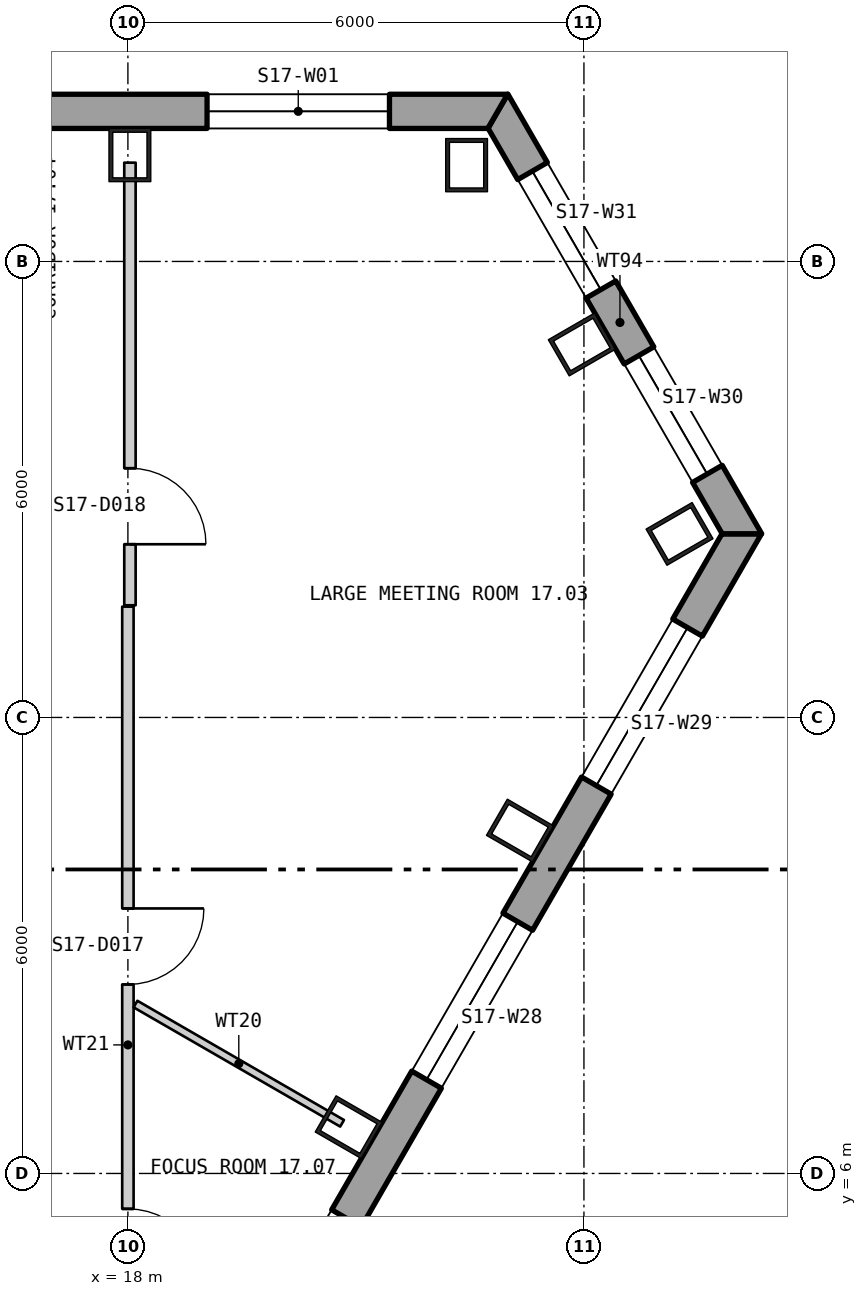
"""IFC4 building model, lengths in metres.
Left out: names, types, materials, properties, quantities, classifications, styles, units other than length and angle.
Written with IfcOpenShell. Run it as: python <this file> out.ifc"""

import sys

from ifc_helpers import new_model, si_unit, direction, frame, frame_2d, origin, origin_2d, place, context, subcontext, project, spatial, polyline, rectangle, hollow_rectangle, outline, extrude, element, fill, save


model = new_model("IFC4")
c1 = context("Model", 3, precision=1e-05, world=origin(), true_north=direction((0.0, 1.0)))
c2 = subcontext(c1, "Body", "Model", "MODEL_VIEW")
j1 = project(units=[si_unit("LENGTHUNIT", "METRE"), si_unit("PLANEANGLEUNIT", "RADIAN")], contexts=[c1])
p1 = place(None, origin())
s1 = spatial("IfcSite", under=j1, at=p1, CompositionType="ELEMENT")
p2 = place(p1, origin())
s2 = spatial("IfcBuilding", under=s1, at=p2, CompositionType="ELEMENT")
p3 = place(p2, frame((0.0, 0.0, 227.7)))
s3 = spatial("IfcBuildingStorey", under=s2, at=p3, CompositionType="ELEMENT", Elevation=227.7)
for number, where, z_axis, x_axis in (
    (1, (22.456, 19.267, 0.0), (0.0, 0.0, 1.0), (-1.0, 0.0, 0.0)),
    (2, (18.026, 19.4, 0.0), (0.0, 0.0, 1.0), (-1.0, 0.0, 0.0)),
    (3, (20.905, 6.609, 0.0), (0.0, 0.0, 1.0), (0.5, 0.866, 0.0)),
    (4, (23.158, 10.512, 0.0), (0.0, 0.0, 1.0), (0.5, 0.866, 0.0)),
    (5, (25.258, 14.415, 0.0), (0.0, 0.0, 1.0), (-0.5, 0.866, 0.0)),
    (6, (23.972, 16.907, 0.0), (0.0, 0.0, 1.0), (-0.5, 0.866, 0.0)),
):
    element("IfcColumn", number, at=place(p3, frame(where, z_axis=z_axis, x_axis=x_axis)), inside=s3, PredefinedType="COLUMN", context=c2, shape_type="SweptSolid", body=[
        extrude(hollow_rectangle(XDim=0.55, YDim=0.7, WallThickness=0.05, at=origin_2d()), origin(), (0.0, 0.0, 1.0), 3.9),
    ])
p4 = place(p3, frame((22.865, 19.975, -0.4), z_axis=(0.0, 0.0, 1.0), x_axis=(-1.0, 0.0, 0.0)))
e7 = element("IfcWall", 7, at=p4, inside=s3, PredefinedType="SOLIDWALL", context=c2, shape_type="SweptSolid", body=[
    extrude(outline(polyline([(-0.13, -0.225), (45.86, -0.225), (45.6, 0.225), (0.13, 0.225), (-0.13, -0.225)])), origin(), (0.0, 0.0, 1.0), 3.9),
])
p5 = place(p4, frame((1.424, 0.0, 1.3)))
e8 = element("IfcOpeningElement", 8, at=p5, cuts=e7, PredefinedType="OPENING", context=c2, shape_type="SweptSolid", body=[
    extrude(rectangle(XDim=2.4, YDim=2.0, at=frame_2d((1.2, 1.0))), frame((0.0, 0.235, 0.0), z_axis=(0.0, -1.0, 0.0), x_axis=(1.0, 0.0, 0.0)), (0.0, 0.0, 1.0), 0.47),
])
p6 = place(p4, frame((10.399, 0.0, 1.3)))
e9 = element("IfcOpeningElement", 9, at=p6, cuts=e7, PredefinedType="OPENING", context=c2, shape_type="SweptSolid", body=[
    extrude(rectangle(XDim=2.4, YDim=2.0, at=frame_2d((1.2, 1.0))), frame((0.0, 0.235, 0.0), z_axis=(0.0, -1.0, 0.0), x_axis=(1.0, 0.0, 0.0)), (0.0, 0.0, 1.0), 0.47),
])
p7 = place(p4, frame((14.905, 0.0, 1.3)))
e10 = element("IfcOpeningElement", 10, at=p7, cuts=e7, PredefinedType="OPENING", context=c2, shape_type="SweptSolid", body=[
    extrude(rectangle(XDim=2.4, YDim=2.0, at=frame_2d((1.2, 1.0))), frame((0.0, 0.235, 0.0), z_axis=(0.0, -1.0, 0.0), x_axis=(1.0, 0.0, 0.0)), (0.0, 0.0, 1.0), 0.47),
])
p8 = place(p4, frame((19.412, 0.0, 1.3)))
e11 = element("IfcOpeningElement", 11, at=p8, cuts=e7, PredefinedType="OPENING", context=c2, shape_type="SweptSolid", body=[
    extrude(rectangle(XDim=2.4, YDim=2.0, at=frame_2d((1.2, 1.0))), frame((0.0, 0.235, 0.0), z_axis=(0.0, -1.0, 0.0), x_axis=(1.0, 0.0, 0.0)), (0.0, 0.0, 1.0), 0.47),
])
p9 = place(p4, frame((23.918, 0.0, 1.3)))
e12 = element("IfcOpeningElement", 12, at=p9, cuts=e7, PredefinedType="OPENING", context=c2, shape_type="SweptSolid", body=[
    extrude(rectangle(XDim=2.4, YDim=2.0, at=frame_2d((1.2, 1.0))), frame((0.0, 0.235, 0.0), z_axis=(0.0, -1.0, 0.0), x_axis=(1.0, 0.0, 0.0)), (0.0, 0.0, 1.0), 0.47),
])
p10 = place(p4, frame((28.425, 0.0, 1.3)))
e13 = element("IfcOpeningElement", 13, at=p10, cuts=e7, PredefinedType="OPENING", context=c2, shape_type="SweptSolid", body=[
    extrude(rectangle(XDim=2.4, YDim=2.0, at=frame_2d((1.2, 1.0))), frame((0.0, 0.235, 0.0), z_axis=(0.0, -1.0, 0.0), x_axis=(1.0, 0.0, 0.0)), (0.0, 0.0, 1.0), 0.47),
])
p11 = place(p4, frame((32.932, 0.0, 1.3)))
e14 = element("IfcOpeningElement", 14, at=p11, cuts=e7, PredefinedType="OPENING", context=c2, shape_type="SweptSolid", body=[
    extrude(rectangle(XDim=2.4, YDim=2.0, at=frame_2d((1.2, 1.0))), frame((0.0, 0.235, 0.0), z_axis=(0.0, -1.0, 0.0), x_axis=(1.0, 0.0, 0.0)), (0.0, 0.0, 1.0), 0.47),
])
p12 = place(p4, frame((41.907, 0.0, 1.3)))
e15 = element("IfcOpeningElement", 15, at=p12, cuts=e7, PredefinedType="OPENING", context=c2, shape_type="SweptSolid", body=[
    extrude(rectangle(XDim=2.4, YDim=2.0, at=frame_2d((1.2, 1.0))), frame((0.0, 0.235, 0.0), z_axis=(0.0, -1.0, 0.0), x_axis=(1.0, 0.0, 0.0)), (0.0, 0.0, 1.0), 0.47),
])
p13 = place(p3, frame((3.21, -25.189, -0.18), z_axis=(0.0, 0.0, 1.0), x_axis=(0.499999194392, 0.866025868902, 0.0)))
e16 = element("IfcWall", 16, at=p13, inside=s3, PredefinedType="SOLIDWALL", context=c2, shape_type="SweptSolid", body=[
    extrude(outline(polyline([(-0.13, -0.225), (45.86, -0.225), (45.6, 0.225), (0.13, 0.225), (-0.13, -0.225)])), origin(), (0.0, 0.0, 1.0), 3.68),
])
p14 = place(p13, frame((1.424, 0.0, 1.08)))
e17 = element("IfcOpeningElement", 17, at=p14, cuts=e16, PredefinedType="OPENING", context=c2, shape_type="SweptSolid", body=[
    extrude(rectangle(XDim=2.4, YDim=2.0, at=frame_2d((1.2, 1.0))), frame((0.0, 0.235, 0.0), z_axis=(0.0, -1.0, 0.0), x_axis=(1.0, 0.0, 0.0)), (0.0, 0.0, 1.0), 0.47),
])
p15 = place(p13, frame((5.892, 0.0, 1.08)))
e18 = element("IfcOpeningElement", 18, at=p15, cuts=e16, PredefinedType="OPENING", context=c2, shape_type="SweptSolid", body=[
    extrude(rectangle(XDim=2.4, YDim=2.0, at=frame_2d((1.2, 1.0))), frame((0.0, 0.235, 0.0), z_axis=(0.0, -1.0, 0.0), x_axis=(1.0, 0.0, 0.0)), (0.0, 0.0, 1.0), 0.47),
])
p16 = place(p13, frame((10.399, 0.0, 1.08)))
e19 = element("IfcOpeningElement", 19, at=p16, cuts=e16, PredefinedType="OPENING", context=c2, shape_type="SweptSolid", body=[
    extrude(rectangle(XDim=2.4, YDim=2.0, at=frame_2d((1.2, 1.0))), frame((0.0, 0.235, 0.0), z_axis=(0.0, -1.0, 0.0), x_axis=(1.0, 0.0, 0.0)), (0.0, 0.0, 1.0), 0.47),
])
p17 = place(p13, frame((14.905, 0.0, 1.08)))
e20 = element("IfcOpeningElement", 20, at=p17, cuts=e16, PredefinedType="OPENING", context=c2, shape_type="SweptSolid", body=[
    extrude(rectangle(XDim=2.4, YDim=2.0, at=frame_2d((1.2, 1.0))), frame((0.0, 0.235, 0.0), z_axis=(0.0, -1.0, 0.0), x_axis=(1.0, 0.0, 0.0)), (0.0, 0.0, 1.0), 0.47),
])
p18 = place(p13, frame((19.412, 0.0, 1.08)))
e21 = element("IfcOpeningElement", 21, at=p18, cuts=e16, PredefinedType="OPENING", context=c2, shape_type="SweptSolid", body=[
    extrude(rectangle(XDim=2.4, YDim=2.0, at=frame_2d((1.2, 1.0))), frame((0.0, 0.235, 0.0), z_axis=(0.0, -1.0, 0.0), x_axis=(1.0, 0.0, 0.0)), (0.0, 0.0, 1.0), 0.47),
])
p19 = place(p13, frame((23.918, 0.0, 1.08)))
e22 = element("IfcOpeningElement", 22, at=p19, cuts=e16, PredefinedType="OPENING", context=c2, shape_type="SweptSolid", body=[
    extrude(rectangle(XDim=2.4, YDim=2.0, at=frame_2d((1.2, 1.0))), frame((0.0, 0.235, 0.0), z_axis=(0.0, -1.0, 0.0), x_axis=(1.0, 0.0, 0.0)), (0.0, 0.0, 1.0), 0.47),
])
p20 = place(p13, frame((32.932, 0.0, 1.08)))
e23 = element("IfcOpeningElement", 23, at=p20, cuts=e16, PredefinedType="OPENING", context=c2, shape_type="SweptSolid", body=[
    extrude(rectangle(XDim=2.4, YDim=2.0, at=frame_2d((1.2, 1.0))), frame((0.0, 0.235, 0.0), z_axis=(0.0, -1.0, 0.0), x_axis=(1.0, 0.0, 0.0)), (0.0, 0.0, 1.0), 0.47),
])
p21 = place(p13, frame((37.438, 0.0, 1.08)))
e24 = element("IfcOpeningElement", 24, at=p21, cuts=e16, PredefinedType="OPENING", context=c2, shape_type="SweptSolid", body=[
    extrude(rectangle(XDim=2.4, YDim=2.0, at=frame_2d((1.2, 1.0))), frame((0.0, 0.235, 0.0), z_axis=(0.0, -1.0, 0.0), x_axis=(1.0, 0.0, 0.0)), (0.0, 0.0, 1.0), 0.47),
])
p22 = place(p13, frame((41.907, 0.0, 1.08)))
e25 = element("IfcOpeningElement", 25, at=p22, cuts=e16, PredefinedType="OPENING", context=c2, shape_type="SweptSolid", body=[
    extrude(rectangle(XDim=2.4, YDim=2.0, at=frame_2d((1.2, 1.0))), frame((0.0, 0.235, 0.0), z_axis=(0.0, -1.0, 0.0), x_axis=(1.0, 0.0, 0.0)), (0.0, 0.0, 1.0), 0.47),
])
p23 = place(p3, frame((26.079, 14.417, -0.4), z_axis=(0.0, 0.0, 1.0), x_axis=(-0.499997052475, 0.866027105532, 0.0)))
e26 = element("IfcWall", 26, at=p23, inside=s3, PredefinedType="SOLIDWALL", context=c2, shape_type="SweptSolid", body=[
    extrude(outline(polyline([(-0.13, -0.225), (6.55, -0.225), (6.29, 0.225), (0.13, 0.225), (-0.13, -0.225)])), origin(), (0.0, 0.0, 1.0), 3.9),
])
p24 = place(p23, frame((0.909, 0.0, 1.3)))
e27 = element("IfcOpeningElement", 27, at=p24, cuts=e26, PredefinedType="OPENING", context=c2, shape_type="SweptSolid", body=[
    extrude(rectangle(XDim=1.8, YDim=2.0, at=frame_2d((0.9, 1.0))), frame((0.0, 0.235, 0.0), z_axis=(0.0, -1.0, 0.0), x_axis=(1.0, 0.0, 0.0)), (0.0, 0.0, 1.0), 0.47),
])
p25 = place(p23, frame((3.711, 0.0, 1.3)))
e28 = element("IfcOpeningElement", 28, at=p25, cuts=e26, PredefinedType="OPENING", context=c2, shape_type="SweptSolid", body=[
    extrude(rectangle(XDim=1.8, YDim=2.0, at=frame_2d((0.9, 1.0))), frame((0.0, 0.235, 0.0), z_axis=(0.0, -1.0, 0.0), x_axis=(1.0, 0.0, 0.0)), (0.0, 0.0, 1.0), 0.47),
])
p26 = place(p3, frame((18.0, 1.925, 0.0), z_axis=(0.0, 0.0, 1.0), x_axis=(0.0, 1.0, 0.0)))
e29 = element("IfcWall", 29, at=p26, inside=s3, PredefinedType="PARTITIONING", context=c2, shape_type="SweptSolid", body=[
    extrude(rectangle(XDim=11.533, YDim=0.15, at=frame_2d((5.766, 0.0))), origin(), (0.0, 0.0, 1.0), 3.7),
])
p27 = place(p26, frame((2.609, 0.0, 0.0)))
e30 = element("IfcOpeningElement", 30, at=p27, cuts=e29, PredefinedType="OPENING", context=c2, shape_type="SweptSolid", body=[
    extrude(rectangle(XDim=1.0, YDim=2.1, at=frame_2d((0.5, 1.05))), frame((0.0, 0.085, 0.0), z_axis=(0.0, -1.0, 0.0), x_axis=(1.0, 0.0, 0.0)), (0.0, 0.0, 1.0), 0.17),
])
p28 = place(p26, frame((6.562, 0.0, 0.0)))
e31 = element("IfcOpeningElement", 31, at=p28, cuts=e29, PredefinedType="OPENING", context=c2, shape_type="SweptSolid", body=[
    extrude(rectangle(XDim=1.0, YDim=2.1, at=frame_2d((0.5, 1.05))), frame((0.0, 0.085, 0.0), z_axis=(0.0, -1.0, 0.0), x_axis=(1.0, 0.0, 0.0)), (0.0, 0.0, 1.0), 0.17),
])
p29 = place(p3, frame((18.027, 13.476, 0.0), z_axis=(0.0, 0.0, 1.0), x_axis=(0.0, 1.0, 0.0)))
e32 = element("IfcWall", 32, at=p29, inside=s3, PredefinedType="PARTITIONING", context=c2, shape_type="SweptSolid", body=[
    extrude(rectangle(XDim=5.824, YDim=0.15, at=frame_2d((2.912, 0.0))), origin(), (0.0, 0.0, 1.0), 3.7),
])
p30 = place(p29, frame((0.803, 0.0, 0.0)))
e33 = element("IfcOpeningElement", 33, at=p30, cuts=e32, PredefinedType="OPENING", context=c2, shape_type="SweptSolid", body=[
    extrude(rectangle(XDim=1.0, YDim=2.1, at=frame_2d((0.5, 1.05))), frame((0.0, 0.085, 0.0), z_axis=(0.0, -1.0, 0.0), x_axis=(1.0, 0.0, 0.0)), (0.0, 0.0, 1.0), 0.17),
])
p31 = place(p3, frame((18.1, 8.229, 0.0), z_axis=(0.0, 0.0, 1.0), x_axis=(0.866058244174, -0.499943114462, 0.0)))
e34 = element("IfcWall", 34, at=p31, inside=s3, PredefinedType="PARTITIONING", context=c2, shape_type="SweptSolid", body=[
    extrude(rectangle(XDim=3.138, YDim=0.1, at=frame_2d((1.569, 0.0))), origin(), (0.0, 0.0, 1.0), 3.7),
])
p32 = place(p5, origin())
e35 = element("IfcWindow", 35, at=p32, inside=s3, PartitioningType="SINGLE_PANEL", PredefinedType="WINDOW", context=c2, shape_type="SweptSolid", body=[
    extrude(rectangle(XDim=2.4, YDim=2.0, at=frame_2d((1.2, 1.0))), frame((0.0, 0.105, 0.0), z_axis=(0.0, -1.0, 0.0), x_axis=(1.0, 0.0, 0.0)), (0.0, 0.0, 1.0), 0.06),
])
fill(e8, e35)
p33 = place(p20, origin())
e36 = element("IfcWindow", 36, at=p33, inside=s3, PartitioningType="SINGLE_PANEL", PredefinedType="WINDOW", context=c2, shape_type="SweptSolid", body=[
    extrude(rectangle(XDim=2.4, YDim=2.0, at=frame_2d((1.2, 1.0))), frame((0.0, 0.105, 0.0), z_axis=(0.0, -1.0, 0.0), x_axis=(1.0, 0.0, 0.0)), (0.0, 0.0, 1.0), 0.06),
])
fill(e23, e36)
p34 = place(p21, origin())
e37 = element("IfcWindow", 37, at=p34, inside=s3, PartitioningType="SINGLE_PANEL", PredefinedType="WINDOW", context=c2, shape_type="SweptSolid", body=[
    extrude(rectangle(XDim=2.4, YDim=2.0, at=frame_2d((1.2, 1.0))), frame((0.0, 0.105, 0.0), z_axis=(0.0, -1.0, 0.0), x_axis=(1.0, 0.0, 0.0)), (0.0, 0.0, 1.0), 0.06),
])
fill(e24, e37)
p35 = place(p22, origin())
e38 = element("IfcWindow", 38, at=p35, inside=s3, PartitioningType="SINGLE_PANEL", PredefinedType="WINDOW", context=c2, shape_type="SweptSolid", body=[
    extrude(rectangle(XDim=2.4, YDim=2.0, at=frame_2d((1.2, 1.0))), frame((0.0, 0.105, 0.0), z_axis=(0.0, -1.0, 0.0), x_axis=(1.0, 0.0, 0.0)), (0.0, 0.0, 1.0), 0.06),
])
fill(e25, e38)
p36 = place(p24, origin())
e39 = element("IfcWindow", 39, at=p36, inside=s3, PartitioningType="SINGLE_PANEL", PredefinedType="WINDOW", context=c2, shape_type="SweptSolid", body=[
    extrude(rectangle(XDim=1.8, YDim=2.0, at=frame_2d((0.9, 1.0))), frame((0.0, 0.105, 0.0), z_axis=(0.0, -1.0, 0.0), x_axis=(1.0, 0.0, 0.0)), (0.0, 0.0, 1.0), 0.06),
])
fill(e27, e39)
p37 = place(p25, origin())
e40 = element("IfcWindow", 40, at=p37, inside=s3, PartitioningType="SINGLE_PANEL", PredefinedType="WINDOW", context=c2, shape_type="SweptSolid", body=[
    extrude(rectangle(XDim=1.8, YDim=2.0, at=frame_2d((0.9, 1.0))), frame((0.0, 0.105, 0.0), z_axis=(0.0, -1.0, 0.0), x_axis=(1.0, 0.0, 0.0)), (0.0, 0.0, 1.0), 0.06),
])
fill(e28, e40)
p38 = place(p27, origin())
e41 = element("IfcDoor", 41, at=p38, inside=s3, OperationType="SINGLE_SWING_LEFT", PredefinedType="DOOR", context=c2, shape_type="SweptSolid", body=[
    extrude(rectangle(XDim=1.0, YDim=2.1, at=frame_2d((0.5, 1.05))), frame((0.0, 0.025, 0.0), z_axis=(0.0, -1.0, 0.0), x_axis=(1.0, 0.0, 0.0)), (0.0, 0.0, 1.0), 0.05),
])
fill(e30, e41)
p39 = place(p28, origin())
e42 = element("IfcDoor", 42, at=p39, inside=s3, OperationType="SINGLE_SWING_RIGHT", PredefinedType="DOOR", context=c2, shape_type="SweptSolid", body=[
    extrude(rectangle(XDim=1.0, YDim=2.1, at=frame_2d((0.5, 1.05))), frame((0.0, 0.025, 0.0), z_axis=(0.0, -1.0, 0.0), x_axis=(1.0, 0.0, 0.0)), (0.0, 0.0, 1.0), 0.05),
])
fill(e31, e42)
p40 = place(p30, origin())
e43 = element("IfcDoor", 43, at=p40, inside=s3, OperationType="SINGLE_SWING_LEFT", PredefinedType="DOOR", context=c2, shape_type="SweptSolid", body=[
    extrude(rectangle(XDim=1.0, YDim=2.1, at=frame_2d((0.5, 1.05))), frame((0.0, 0.025, 0.0), z_axis=(0.0, -1.0, 0.0), x_axis=(1.0, 0.0, 0.0)), (0.0, 0.0, 1.0), 0.05),
])
fill(e33, e43)
save(model, sys.argv[1])
